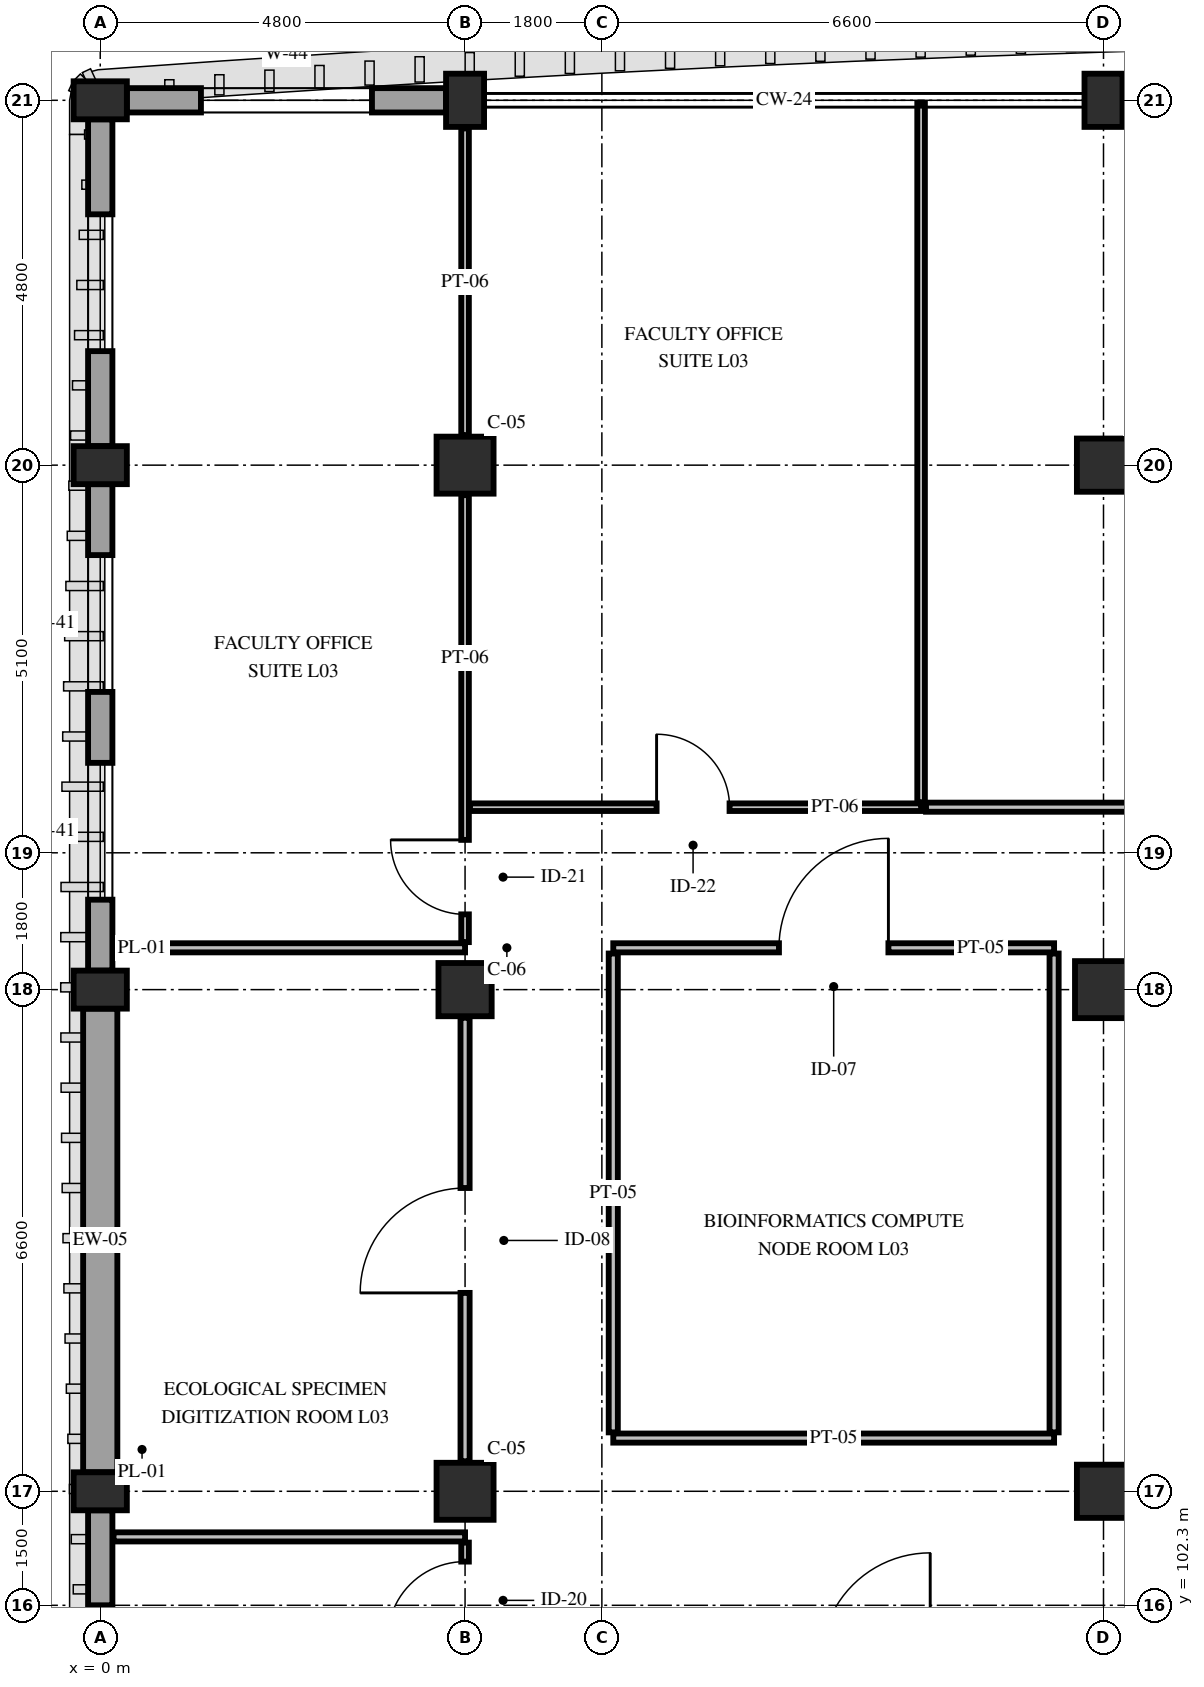
"""IFC4 building model, lengths in metres.
Left out: names, types, materials, properties, quantities, classifications, styles, units other than length and angle.
Written with IfcOpenShell. Run it as: python <this file> out.ifc"""

import sys

from ifc_helpers import new_model, si_unit, direction, frame, frame_2d, origin, origin_2d, place, context, subcontext, project, spatial, rectangle, extrude, element, fill, save


model = new_model("IFC4")
c1 = context("Model", 3, precision=1e-05, world=origin(), true_north=direction((0.0, 1.0)))
c2 = subcontext(c1, "Body", "Model", "MODEL_VIEW")
j1 = project(units=[si_unit("LENGTHUNIT", "METRE"), si_unit("PLANEANGLEUNIT", "RADIAN")], contexts=[c1])
p1 = place(None, origin())
s1 = spatial("IfcSite", under=j1, at=p1, CompositionType="ELEMENT")
p2 = place(p1, origin())
s2 = spatial("IfcBuilding", under=s1, at=p2, CompositionType="ELEMENT")
p3 = place(p2, frame((0.0, 0.0, 15.0)))
s3 = spatial("IfcBuildingStorey", under=s2, at=p3, CompositionType="ELEMENT", Elevation=15.0)
for number, where, z_axis, x_axis in (
    (1, (0.0, 103.8, 0.0), (0.0, 0.0, 1.0), (0.0, 1.0, 0.0)),
    (2, (0.0, 110.4, 0.0), (0.0, 0.0, 1.0), (0.0, 1.0, 0.0)),
    (3, (0.0, 117.3, 0.0), (0.0, 0.0, 1.0), (0.0, 1.0, 0.0)),
    (4, (0.0, 122.1, 0.0), (0.0, 0.0, 1.0), (0.0, 1.0, 0.0)),
):
    element("IfcColumn", number, at=place(p3, frame(where, z_axis=z_axis, x_axis=x_axis)), inside=s3, PredefinedType="PILASTER", context=c2, shape_type="SweptSolid", body=[
        extrude(rectangle(XDim=0.5, YDim=0.7, at=origin_2d()), origin(), (0.0, 0.0, 1.0), 4.8),
    ])
p4 = place(p3, frame((4.8, 103.8, 0.0), z_axis=(0.0, 0.0, 1.0), x_axis=(1.0, 0.0, 0.0)))
e5 = element("IfcColumn", 5, at=p4, inside=s3, PredefinedType="COLUMN", context=c2, shape_type="SweptSolid", body=[
    extrude(rectangle(XDim=0.75, YDim=0.75, at=origin_2d()), origin(), (0.0, 0.0, 1.0), 4.8),
])
p5 = place(p3, frame((4.8, 110.4, 0.0), z_axis=(0.0, 0.0, 1.0), x_axis=(1.0, 0.0, 0.0)))
e6 = element("IfcColumn", 6, at=p5, inside=s3, PredefinedType="COLUMN", context=c2, shape_type="SweptSolid", body=[
    extrude(rectangle(XDim=0.7, YDim=0.7, at=origin_2d()), origin(), (0.0, 0.0, 1.0), 4.8),
])
p6 = place(p3, frame((4.8, 117.3, 0.0), z_axis=(0.0, 0.0, 1.0), x_axis=(1.0, 0.0, 0.0)))
e7 = element("IfcColumn", 7, at=p6, inside=s3, PredefinedType="COLUMN", context=c2, shape_type="SweptSolid", body=[
    extrude(rectangle(XDim=0.75, YDim=0.75, at=origin_2d()), origin(), (0.0, 0.0, 1.0), 4.8),
])
p7 = place(p3, frame((4.8, 122.1, 0.0), z_axis=(0.0, 0.0, 1.0), x_axis=(1.0, 0.0, 0.0)))
e8 = element("IfcColumn", 8, at=p7, inside=s3, PredefinedType="PILASTER", context=c2, shape_type="SweptSolid", body=[
    extrude(rectangle(XDim=0.5, YDim=0.7, at=origin_2d()), origin(), (0.0, 0.0, 1.0), 4.8),
])
p8 = place(p3, frame((13.2, 103.8, 0.0), z_axis=(0.0, 0.0, 1.0), x_axis=(1.0, 0.0, 0.0)))
e9 = element("IfcColumn", 9, at=p8, inside=s3, PredefinedType="COLUMN", context=c2, shape_type="SweptSolid", body=[
    extrude(rectangle(XDim=0.7, YDim=0.7, at=origin_2d()), origin(), (0.0, 0.0, 1.0), 4.8),
])
p9 = place(p3, frame((13.2, 110.4, 0.0), z_axis=(0.0, 0.0, 1.0), x_axis=(1.0, 0.0, 0.0)))
e10 = element("IfcColumn", 10, at=p9, inside=s3, PredefinedType="COLUMN", context=c2, shape_type="SweptSolid", body=[
    extrude(rectangle(XDim=0.75, YDim=0.75, at=origin_2d()), origin(), (0.0, 0.0, 1.0), 4.8),
])
p10 = place(p3, frame((13.2, 117.3, 0.0), z_axis=(0.0, 0.0, 1.0), x_axis=(1.0, 0.0, 0.0)))
e11 = element("IfcColumn", 11, at=p10, inside=s3, PredefinedType="COLUMN", context=c2, shape_type="SweptSolid", body=[
    extrude(rectangle(XDim=0.7, YDim=0.7, at=origin_2d()), origin(), (0.0, 0.0, 1.0), 4.8),
])
p11 = place(p3, frame((13.2, 122.1, 0.0), z_axis=(0.0, 0.0, 1.0), x_axis=(1.0, 0.0, 0.0)))
e12 = element("IfcColumn", 12, at=p11, inside=s3, PredefinedType="PILASTER", context=c2, shape_type="SweptSolid", body=[
    extrude(rectangle(XDim=0.5, YDim=0.7, at=origin_2d()), origin(), (0.0, 0.0, 1.0), 4.8),
])
p12 = place(p3, frame((0.0, 99.25, 0.0), z_axis=(0.0, 0.0, 1.0), x_axis=(0.0, 1.0, 0.0)))
e13 = element("IfcWall", 13, at=p12, inside=s3, PredefinedType="STANDARD", context=c2, shape_type="SweptSolid", body=[
    extrude(rectangle(XDim=4.3, YDim=0.32, at=frame_2d((2.15, 0.0))), origin(), (0.0, 0.0, 1.0), 3.95),
])
p13 = place(p12, frame((1.25, 0.0, 0.85)))
e14 = element("IfcOpeningElement", 14, at=p13, cuts=e13, PredefinedType="OPENING", context=c2, shape_type="SweptSolid", body=[
    extrude(rectangle(XDim=1.8, YDim=2.24, at=frame_2d((0.9, 1.12))), frame((0.0, 0.175, 0.0), z_axis=(0.0, -1.0, 0.0), x_axis=(1.0, 0.0, 0.0)), (0.0, 0.0, 1.0), 0.35),
])
p14 = place(p3, frame((0.0, 104.05, 0.0), z_axis=(0.0, 0.0, 1.0), x_axis=(0.0, 1.0, 0.0)))
e15 = element("IfcWall", 15, at=p14, inside=s3, PredefinedType="SOLIDWALL", context=c2, shape_type="SweptSolid", body=[
    extrude(rectangle(XDim=6.1, YDim=0.45, at=frame_2d((3.05, 0.0))), origin(), (0.0, 0.0, 1.0), 3.95),
])
p15 = place(p3, frame((0.0, 110.65, 0.0), z_axis=(0.0, 0.0, 1.0), x_axis=(0.0, 1.0, 0.0)))
e16 = element("IfcWall", 16, at=p15, inside=s3, PredefinedType="STANDARD", context=c2, shape_type="SweptSolid", body=[
    extrude(rectangle(XDim=6.4, YDim=0.32, at=frame_2d((3.2, 0.0))), origin(), (0.0, 0.0, 1.0), 3.95),
])
p16 = place(p15, frame((0.933, 0.0, 0.85)))
e17 = element("IfcOpeningElement", 17, at=p16, cuts=e16, PredefinedType="OPENING", context=c2, shape_type="SweptSolid", body=[
    extrude(rectangle(XDim=1.8, YDim=2.24, at=frame_2d((0.9, 1.12))), frame((0.0, 0.175, 0.0), z_axis=(0.0, -1.0, 0.0), x_axis=(1.0, 0.0, 0.0)), (0.0, 0.0, 1.0), 0.35),
])
p17 = place(p15, frame((3.667, 0.0, 0.85)))
e18 = element("IfcOpeningElement", 18, at=p17, cuts=e16, PredefinedType="OPENING", context=c2, shape_type="SweptSolid", body=[
    extrude(rectangle(XDim=1.8, YDim=2.24, at=frame_2d((0.9, 1.12))), frame((0.0, 0.175, 0.0), z_axis=(0.0, -1.0, 0.0), x_axis=(1.0, 0.0, 0.0)), (0.0, 0.0, 1.0), 0.35),
])
p18 = place(p3, frame((0.0, 117.55, 0.0), z_axis=(0.0, 0.0, 1.0), x_axis=(0.0, 1.0, 0.0)))
e19 = element("IfcWall", 19, at=p18, inside=s3, PredefinedType="STANDARD", context=c2, shape_type="SweptSolid", body=[
    extrude(rectangle(XDim=4.3, YDim=0.32, at=frame_2d((2.15, 0.0))), origin(), (0.0, 0.0, 1.0), 3.95),
])
p19 = place(p18, frame((1.25, 0.0, 0.85)))
e20 = element("IfcOpeningElement", 20, at=p19, cuts=e19, PredefinedType="OPENING", context=c2, shape_type="SweptSolid", body=[
    extrude(rectangle(XDim=1.8, YDim=2.24, at=frame_2d((0.9, 1.12))), frame((0.0, 0.175, 0.0), z_axis=(0.0, -1.0, 0.0), x_axis=(1.0, 0.0, 0.0)), (0.0, 0.0, 1.0), 0.35),
])
p20 = place(p3, frame((0.35, 122.1, 0.0), z_axis=(0.0, 0.0, 1.0), x_axis=(1.0, 0.0, 0.0)))
e21 = element("IfcWall", 21, at=p20, inside=s3, PredefinedType="STANDARD", context=c2, shape_type="SweptSolid", body=[
    extrude(rectangle(XDim=4.2, YDim=0.32, at=frame_2d((2.1, 0.0))), origin(), (0.0, 0.0, 1.0), 3.95),
])
p21 = place(p20, frame((0.975, 0.0, 0.85)))
e22 = element("IfcOpeningElement", 22, at=p21, cuts=e21, PredefinedType="OPENING", context=c2, shape_type="SweptSolid", body=[
    extrude(rectangle(XDim=2.25, YDim=2.24, at=frame_2d((1.125, 1.12))), frame((0.0, 0.175, 0.0), z_axis=(0.0, -1.0, 0.0), x_axis=(1.0, 0.0, 0.0)), (0.0, 0.0, 1.0), 0.35),
])
p22 = place(p3, frame((13.45, 122.1, 0.0), z_axis=(0.0, 0.0, 1.0), x_axis=(1.0, 0.0, 0.0)))
e23 = element("IfcWall", 23, at=p22, inside=s3, PredefinedType="STANDARD", context=c2, shape_type="SweptSolid", body=[
    extrude(rectangle(XDim=6.1, YDim=0.32, at=frame_2d((3.05, 0.0))), origin(), (0.0, 0.0, 1.0), 3.93),
])
p23 = place(p22, frame((1.925, 0.0, 0.85)))
e24 = element("IfcOpeningElement", 24, at=p23, cuts=e23, PredefinedType="OPENING", context=c2, shape_type="SweptSolid", body=[
    extrude(rectangle(XDim=2.25, YDim=2.24, at=frame_2d((1.125, 1.12))), frame((0.0, 0.175, 0.0), z_axis=(0.0, -1.0, 0.0), x_axis=(1.0, 0.0, 0.0)), (0.0, 0.0, 1.0), 0.35),
])
p24 = place(p3, frame((6.75, 104.5, 0.0), z_axis=(0.0, 0.0, 1.0), x_axis=(1.0, 0.0, 0.0)))
e25 = element("IfcWall", 25, at=p24, inside=s3, PredefinedType="PARTITIONING", context=c2, shape_type="SweptSolid", body=[
    extrude(rectangle(XDim=5.8, YDim=0.12, at=frame_2d((2.9, 0.0))), origin(), (0.0, 0.0, 1.0), 4.295),
])
p25 = place(p3, frame((6.75, 110.95, 0.0), z_axis=(0.0, 0.0, 1.0), x_axis=(1.0, 0.0, 0.0)))
e26 = element("IfcWall", 26, at=p25, inside=s3, PredefinedType="PARTITIONING", context=c2, shape_type="SweptSolid", body=[
    extrude(rectangle(XDim=5.8, YDim=0.12, at=frame_2d((2.9, 0.0))), origin(), (0.0, 0.0, 1.0), 4.295),
])
p26 = place(p25, frame((2.18, 0.0, 0.0)))
e27 = element("IfcOpeningElement", 27, at=p26, cuts=e26, PredefinedType="OPENING", context=c2, shape_type="SweptSolid", body=[
    extrude(rectangle(XDim=1.44, YDim=2.25, at=frame_2d((0.72, 1.125))), frame((0.0, 0.075, 0.0), z_axis=(0.0, -1.0, 0.0), x_axis=(1.0, 0.0, 0.0)), (0.0, 0.0, 1.0), 0.15),
])
for number, where, z_axis, x_axis in (
    (28, (6.75, 104.575, 0.0), (0.0, 0.0, 1.0), (0.0, 1.0, 0.0)),
    (29, (12.55, 104.575, 0.0), (0.0, 0.0, 1.0), (0.0, 1.0, 0.0)),
):
    element("IfcWall", number, at=place(p3, frame(where, z_axis=z_axis, x_axis=x_axis)), inside=s3, PredefinedType="PARTITIONING", context=c2, shape_type="SweptSolid", body=[
        extrude(rectangle(XDim=6.3, YDim=0.12, at=frame_2d((3.15, 0.0))), origin(), (0.0, 0.0, 1.0), 3.83),
    ])
for number, where, z_axis, x_axis in (
    (30, (0.175, 103.2, 0.0), (0.0, 0.0, 1.0), (1.0, 0.0, 0.0)),
    (31, (0.175, 110.95, 0.0), (0.0, 0.0, 1.0), (1.0, 0.0, 0.0)),
):
    element("IfcWall", number, at=place(p3, frame(where, z_axis=z_axis, x_axis=x_axis)), inside=s3, PredefinedType="PARTITIONING", context=c2, shape_type="SweptSolid", body=[
        extrude(rectangle(XDim=4.625, YDim=0.12, at=frame_2d((2.312, 0.0))), origin(), (0.0, 0.0, 1.0), 4.08),
    ])
p27 = place(p3, frame((4.8, 104.195, 0.0), z_axis=(0.0, 0.0, 1.0), x_axis=(0.0, 1.0, 0.0)))
e32 = element("IfcWall", 32, at=p27, inside=s3, PredefinedType="PARTITIONING", context=c2, shape_type="SweptSolid", body=[
    extrude(rectangle(XDim=5.835, YDim=0.12, at=frame_2d((2.917, 0.0))), origin(), (0.0, 0.0, 1.0), 4.13),
])
p28 = place(p27, frame((2.215, 0.0, 0.0)))
e33 = element("IfcOpeningElement", 33, at=p28, cuts=e32, PredefinedType="OPENING", context=c2, shape_type="SweptSolid", body=[
    extrude(rectangle(XDim=1.38, YDim=2.25, at=frame_2d((0.69, 1.125))), frame((0.0, 0.075, 0.0), z_axis=(0.0, -1.0, 0.0), x_axis=(1.0, 0.0, 0.0)), (0.0, 0.0, 1.0), 0.15),
])
p29 = place(p3, frame((4.8, 111.025, 0.0), z_axis=(0.0, 0.0, 1.0), x_axis=(0.0, 1.0, 0.0)))
e34 = element("IfcWall", 34, at=p29, inside=s3, PredefinedType="PARTITIONING", context=c2, shape_type="SweptSolid", body=[
    extrude(rectangle(XDim=5.88, YDim=0.1, at=frame_2d((2.94, 0.0))), origin(), (0.0, 0.0, 1.0), 4.13),
])
p30 = place(p29, frame((0.365, 0.0, 0.0)))
e35 = element("IfcOpeningElement", 35, at=p30, cuts=e34, PredefinedType="OPENING", context=c2, shape_type="SweptSolid", body=[
    extrude(rectangle(XDim=0.98, YDim=2.2, at=frame_2d((0.49, 1.1))), frame((0.0, 0.065, 0.0), z_axis=(0.0, -1.0, 0.0), x_axis=(1.0, 0.0, 0.0)), (0.0, 0.0, 1.0), 0.13),
])
p31 = place(p3, frame((4.8, 117.695, 0.0), z_axis=(0.0, 0.0, 1.0), x_axis=(0.0, 1.0, 0.0)))
e36 = element("IfcWall", 36, at=p31, inside=s3, PredefinedType="PARTITIONING", context=c2, shape_type="SweptSolid", body=[
    extrude(rectangle(XDim=4.035, YDim=0.1, at=frame_2d((2.018, 0.0))), origin(), (0.0, 0.0, 1.0), 4.13),
])
p32 = place(p3, frame((4.865, 112.8, 0.0), z_axis=(0.0, 0.0, 1.0), x_axis=(1.0, 0.0, 0.0)))
e37 = element("IfcWall", 37, at=p32, inside=s3, PredefinedType="PARTITIONING", context=c2, shape_type="SweptSolid", body=[
    extrude(rectangle(XDim=5.935, YDim=0.1, at=frame_2d((2.968, 0.0))), origin(), (0.0, 0.0, 1.0), 4.13),
])
p33 = place(p32, frame((2.455, 0.0, 0.0)))
e38 = element("IfcOpeningElement", 38, at=p33, cuts=e37, PredefinedType="OPENING", context=c2, shape_type="SweptSolid", body=[
    extrude(rectangle(XDim=0.96, YDim=2.15, at=frame_2d((0.48, 1.075))), frame((0.0, 0.065, 0.0), z_axis=(0.0, -1.0, 0.0), x_axis=(1.0, 0.0, 0.0)), (0.0, 0.0, 1.0), 0.13),
])
p34 = place(p3, frame((10.8, 112.865, 0.0), z_axis=(0.0, 0.0, 1.0), x_axis=(0.0, 1.0, 0.0)))
e39 = element("IfcWall", 39, at=p34, inside=s3, PredefinedType="PARTITIONING", context=c2, shape_type="SweptSolid", body=[
    extrude(rectangle(XDim=9.195, YDim=0.1, at=frame_2d((4.598, 0.0))), origin(), (0.0, 0.0, 1.0), 3.83),
])
p35 = place(p3, frame((10.865, 112.8, 0.0), z_axis=(0.0, 0.0, 1.0), x_axis=(1.0, 0.0, 0.0)))
e40 = element("IfcWall", 40, at=p35, inside=s3, PredefinedType="PARTITIONING", context=c2, shape_type="SweptSolid", body=[
    extrude(rectangle(XDim=11.135, YDim=0.12, at=frame_2d((5.567, 0.0))), origin(), (0.0, 0.0, 1.0), 4.13),
])
p36 = place(p35, frame((4.815, 0.0, 0.0)))
e41 = element("IfcOpeningElement", 41, at=p36, cuts=e40, PredefinedType="OPENING", context=c2, shape_type="SweptSolid", body=[
    extrude(rectangle(XDim=1.44, YDim=2.25, at=frame_2d((0.72, 1.125))), frame((0.0, 0.075, 0.0), z_axis=(0.0, -1.0, 0.0), x_axis=(1.0, 0.0, 0.0)), (0.0, 0.0, 1.0), 0.15),
])
p37 = place(p3, frame((4.8, 99.37, 0.0), z_axis=(0.0, 0.0, 1.0), x_axis=(0.0, 1.0, 0.0)))
e42 = element("IfcWall", 42, at=p37, inside=s3, PredefinedType="PARTITIONING", context=c2, shape_type="SweptSolid", body=[
    extrude(rectangle(XDim=3.755, YDim=0.1, at=frame_2d((1.877, 0.0))), origin(), (0.0, 0.0, 1.0), 4.13),
])
p38 = place(p37, frame((2.485, 0.0, 0.0)))
e43 = element("IfcOpeningElement", 43, at=p38, cuts=e42, PredefinedType="OPENING", context=c2, shape_type="SweptSolid", body=[
    extrude(rectangle(XDim=1.02, YDim=2.2, at=frame_2d((0.51, 1.1))), frame((0.0, 0.065, 0.0), z_axis=(0.0, -1.0, 0.0), x_axis=(1.0, 0.0, 0.0)), (0.0, 0.0, 1.0), 0.13),
])
p39 = place(p13, origin())
e44 = element("IfcWindow", 44, at=p39, inside=s3, PartitioningType="DOUBLE_PANEL_VERTICAL", PredefinedType="WINDOW", context=c2, shape_type="SweptSolid", body=[
    extrude(rectangle(XDim=1.8, YDim=2.24, at=frame_2d((0.9, 1.12))), frame((0.0, 0.03, 0.0), z_axis=(0.0, -1.0, 0.0), x_axis=(1.0, 0.0, 0.0)), (0.0, 0.0, 1.0), 0.06),
])
fill(e14, e44)
p40 = place(p16, origin())
e45 = element("IfcWindow", 45, at=p40, inside=s3, PartitioningType="DOUBLE_PANEL_VERTICAL", PredefinedType="WINDOW", context=c2, shape_type="SweptSolid", body=[
    extrude(rectangle(XDim=1.8, YDim=2.24, at=frame_2d((0.9, 1.12))), frame((0.0, 0.03, 0.0), z_axis=(0.0, -1.0, 0.0), x_axis=(1.0, 0.0, 0.0)), (0.0, 0.0, 1.0), 0.06),
])
fill(e17, e45)
p41 = place(p17, origin())
e46 = element("IfcWindow", 46, at=p41, inside=s3, PartitioningType="DOUBLE_PANEL_VERTICAL", PredefinedType="WINDOW", context=c2, shape_type="SweptSolid", body=[
    extrude(rectangle(XDim=1.8, YDim=2.24, at=frame_2d((0.9, 1.12))), frame((0.0, 0.03, 0.0), z_axis=(0.0, -1.0, 0.0), x_axis=(1.0, 0.0, 0.0)), (0.0, 0.0, 1.0), 0.06),
])
fill(e18, e46)
p42 = place(p19, origin())
e47 = element("IfcWindow", 47, at=p42, inside=s3, PartitioningType="DOUBLE_PANEL_VERTICAL", PredefinedType="WINDOW", context=c2, shape_type="SweptSolid", body=[
    extrude(rectangle(XDim=1.8, YDim=2.24, at=frame_2d((0.9, 1.12))), frame((0.0, 0.03, 0.0), z_axis=(0.0, -1.0, 0.0), x_axis=(1.0, 0.0, 0.0)), (0.0, 0.0, 1.0), 0.06),
])
fill(e20, e47)
p43 = place(p21, origin())
e48 = element("IfcWindow", 48, at=p43, inside=s3, PartitioningType="DOUBLE_PANEL_VERTICAL", PredefinedType="WINDOW", context=c2, shape_type="SweptSolid", body=[
    extrude(rectangle(XDim=2.25, YDim=2.24, at=frame_2d((1.125, 1.12))), frame((0.0, 0.03, 0.0), z_axis=(0.0, -1.0, 0.0), x_axis=(1.0, 0.0, 0.0)), (0.0, 0.0, 1.0), 0.06),
])
fill(e22, e48)
p44 = place(p26, origin())
e49 = element("IfcDoor", 49, at=p44, inside=s3, OperationType="SINGLE_SWING_RIGHT", PredefinedType="DOOR", context=c2, shape_type="SweptSolid", body=[
    extrude(rectangle(XDim=1.44, YDim=2.25, at=frame_2d((0.72, 1.125))), frame((0.0, 0.025, 0.0), z_axis=(0.0, -1.0, 0.0), x_axis=(1.0, 0.0, 0.0)), (0.0, 0.0, 1.0), 0.05),
])
fill(e27, e49)
p45 = place(p28, origin())
e50 = element("IfcDoor", 50, at=p45, inside=s3, OperationType="SINGLE_SWING_LEFT", PredefinedType="DOOR", context=c2, shape_type="SweptSolid", body=[
    extrude(rectangle(XDim=1.38, YDim=2.25, at=frame_2d((0.69, 1.125))), frame((0.0, 0.025, 0.0), z_axis=(0.0, -1.0, 0.0), x_axis=(1.0, 0.0, 0.0)), (0.0, 0.0, 1.0), 0.05),
])
fill(e33, e50)
p46 = place(p30, origin())
e51 = element("IfcDoor", 51, at=p46, inside=s3, OperationType="SINGLE_SWING_RIGHT", PredefinedType="DOOR", context=c2, shape_type="SweptSolid", body=[
    extrude(rectangle(XDim=0.98, YDim=2.2, at=frame_2d((0.49, 1.1))), frame((0.0, 0.025, 0.0), z_axis=(0.0, -1.0, 0.0), x_axis=(1.0, 0.0, 0.0)), (0.0, 0.0, 1.0), 0.05),
])
fill(e35, e51)
p47 = place(p33, origin())
e52 = element("IfcDoor", 52, at=p47, inside=s3, OperationType="SINGLE_SWING_LEFT", PredefinedType="DOOR", context=c2, shape_type="SweptSolid", body=[
    extrude(rectangle(XDim=0.96, YDim=2.15, at=frame_2d((0.48, 1.075))), frame((0.0, 0.025, 0.0), z_axis=(0.0, -1.0, 0.0), x_axis=(1.0, 0.0, 0.0)), (0.0, 0.0, 1.0), 0.05),
])
fill(e38, e52)
p48 = place(p38, origin())
e53 = element("IfcDoor", 53, at=p48, inside=s3, OperationType="SINGLE_SWING_LEFT", PredefinedType="DOOR", context=c2, shape_type="SweptSolid", body=[
    extrude(rectangle(XDim=1.02, YDim=2.2, at=frame_2d((0.51, 1.1))), frame((0.0, 0.025, 0.0), z_axis=(0.0, -1.0, 0.0), x_axis=(1.0, 0.0, 0.0)), (0.0, 0.0, 1.0), 0.05),
])
fill(e43, e53)
save(model, sys.argv[1])
